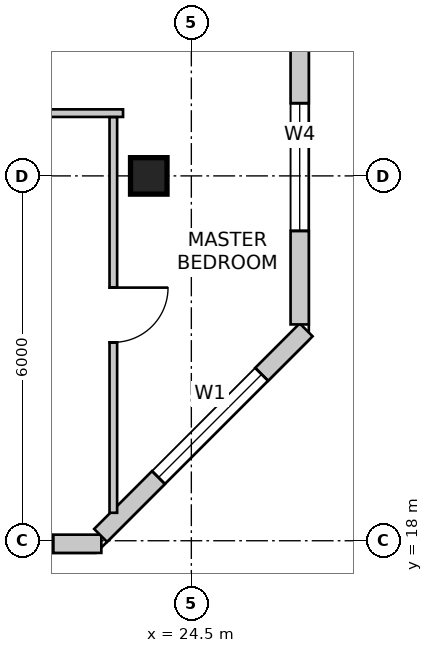
"""IFC4 building model, lengths in metres.
Left out: names, types, materials, properties, quantities, classifications, styles, units other than length and angle.
Written with IfcOpenShell. Run it as: python <this file> out.ifc"""

import sys

from ifc_helpers import new_model, si_unit, direction, frame, frame_2d, origin, origin_2d, place, context, subcontext, project, spatial, rectangle, extrude, source, transform, mapped, element, fill, save


model = new_model("IFC4")
c1 = context("Model", 3, precision=1e-05, world=origin(), true_north=direction((0.0, 1.0)))
c2 = subcontext(c1, "Body", "Model", "MODEL_VIEW")
j1 = project(units=[si_unit("LENGTHUNIT", "METRE"), si_unit("PLANEANGLEUNIT", "RADIAN")], contexts=[c1])
p1 = place(None, origin())
s1 = spatial("IfcSite", under=j1, at=p1, CompositionType="ELEMENT")
p2 = place(p1, origin())
s2 = spatial("IfcBuilding", under=s1, at=p2, CompositionType="ELEMENT")
p3 = place(p2, frame((0.0, 0.0, 249.3)))
s3 = spatial("IfcBuildingStorey", under=s2, at=p3, CompositionType="ELEMENT", Elevation=249.3)
m1 = source(origin(), c2, "Body", "SweptSolid", [
    extrude(rectangle(XDim=0.6, YDim=0.6, at=origin_2d()), origin(), (0.0, 0.0, 1.0), 3.6),
])
p4 = place(p3, frame((23.8, 24.0, 0.0), z_axis=(0.0, 0.0, 1.0), x_axis=(1.0, 0.0, 0.0)))
e1 = element("IfcColumn", 1, at=p4, inside=s3, PredefinedType="COLUMN", context=c2, shape_type="MappedRepresentation", body=[
    mapped(m1, transform((0.0, 0.0, 0.0), scale=1.0)),
])
p5 = place(p3, frame((12.678, 17.95, 0.0), z_axis=(0.0, 0.0, 1.0), x_axis=(1.0, 0.0, 0.0)))
e2 = element("IfcWall", 2, at=p5, inside=s3, PredefinedType="SOLIDWALL", context=c2, shape_type="SweptSolid", body=[
    extrude(rectangle(XDim=10.342, YDim=0.3, at=frame_2d((5.171, 0.0))), origin(), (0.0, 0.0, 1.0), 3.35),
])
m2 = source(origin(), c2, "Body", "SweptSolid", [
    extrude(rectangle(XDim=1.6, YDim=2.15, at=frame_2d((0.8, 1.075))), frame((0.0, 0.16, 0.0), z_axis=(0.0, -1.0, 0.0), x_axis=(1.0, 0.0, 0.0)), (0.0, 0.0, 1.0), 0.32),
])
p6 = place(p5, frame((4.204, 0.0, 0.0)))
e3 = element("IfcOpeningElement", 3, at=p6, cuts=e2, PredefinedType="OPENING", context=c2, shape_type="MappedRepresentation", body=[
    mapped(m2, transform((0.0, 0.0, 0.0), scale=1.0)),
])
m3 = source(origin(), c2, "Body", "SweptSolid", [
    extrude(rectangle(XDim=1.8, YDim=2.1, at=frame_2d((0.9, 1.05))), frame((0.0, 0.16, 0.0), z_axis=(0.0, -1.0, 0.0), x_axis=(1.0, 0.0, 0.0)), (0.0, 0.0, 1.0), 0.32),
])
p7 = place(p5, frame((0.697, 0.0, 0.85)))
e4 = element("IfcOpeningElement", 4, at=p7, cuts=e2, PredefinedType="OPENING", context=c2, shape_type="MappedRepresentation", body=[
    mapped(m3, transform((0.0, 0.0, 0.0), scale=1.0)),
])
m4 = source(origin(), c2, "Body", "SweptSolid", [
    extrude(rectangle(XDim=2.1, YDim=2.0, at=frame_2d((1.05, 1.0))), frame((0.0, 0.16, 0.0), z_axis=(0.0, -1.0, 0.0), x_axis=(1.0, 0.0, 0.0)), (0.0, 0.0, 1.0), 0.32),
])
p8 = place(p5, frame((7.449, 0.0, 0.85)))
e5 = element("IfcOpeningElement", 5, at=p8, cuts=e2, PredefinedType="OPENING", context=c2, shape_type="MappedRepresentation", body=[
    mapped(m4, transform((0.0, 0.0, 0.0), scale=1.0)),
])
p9 = place(p3, frame((23.008, 18.088, 0.0), z_axis=(0.0, 0.0, 1.0), x_axis=(0.707106781187, 0.707106781187, 0.0)))
e6 = element("IfcWall", 6, at=p9, inside=s3, PredefinedType="SOLIDWALL", context=c2, shape_type="SweptSolid", body=[
    extrude(rectangle(XDim=4.781, YDim=0.3, at=frame_2d((2.39, 0.0))), origin(), (0.0, 0.0, 1.0), 3.35),
])
m5 = source(origin(), c2, "Body", "SweptSolid", [
    extrude(rectangle(XDim=2.4, YDim=2.2, at=frame_2d((1.2, 1.1))), frame((0.0, 0.16, 0.0), z_axis=(0.0, -1.0, 0.0), x_axis=(1.0, 0.0, 0.0)), (0.0, 0.0, 1.0), 0.32),
])
p10 = place(p9, frame((1.346, 0.0, 0.85)))
e7 = element("IfcOpeningElement", 7, at=p10, cuts=e6, PredefinedType="OPENING", context=c2, shape_type="MappedRepresentation", body=[
    mapped(m5, transform((0.0, 0.0, 0.0), scale=1.0)),
])
p11 = place(p3, frame((26.282, 21.557, 0.0), z_axis=(0.0, 0.0, 1.0), x_axis=(0.0, 1.0, 0.0)))
e8 = element("IfcWall", 8, at=p11, inside=s3, PredefinedType="SOLIDWALL", context=c2, shape_type="SweptSolid", body=[
    extrude(rectangle(XDim=9.711, YDim=0.3, at=frame_2d((4.855, 0.0))), origin(), (0.0, 0.0, 1.0), 3.35),
])
p12 = place(p11, frame((1.538, 0.0, 0.85)))
e9 = element("IfcOpeningElement", 9, at=p12, cuts=e8, PredefinedType="OPENING", context=c2, shape_type="MappedRepresentation", body=[
    mapped(m4, transform((0.0, 0.0, 0.0), scale=1.0)),
])
p13 = place(p11, frame((5.923, 0.0, 0.85)))
e10 = element("IfcOpeningElement", 10, at=p13, cuts=e8, PredefinedType="OPENING", context=c2, shape_type="MappedRepresentation", body=[
    mapped(m5, transform((0.0, 0.0, 0.0), scale=1.0)),
])
p14 = place(p3, frame((23.377, 25.032, 0.0), z_axis=(0.0, 0.0, 1.0), x_axis=(-1.0, 0.0, 0.0)))
e11 = element("IfcWall", 11, at=p14, inside=s3, PredefinedType="PARTITIONING", context=c2, shape_type="SweptSolid", body=[
    extrude(rectangle(XDim=3.252, YDim=0.125, at=frame_2d((1.626, 0.0))), origin(), (0.0, 0.0, 1.0), 2.935),
])
p15 = place(p3, frame((23.217, 24.966, 0.0), z_axis=(0.0, 0.0, 1.0), x_axis=(0.0, -1.0, 0.0)))
e12 = element("IfcWall", 12, at=p15, inside=s3, PredefinedType="PARTITIONING", context=c2, shape_type="SweptSolid", body=[
    extrude(rectangle(XDim=6.506, YDim=0.125, at=frame_2d((3.253, 0.0))), origin(), (0.0, 0.0, 1.0), 2.935),
])
m6 = source(origin(), c2, "Body", "SweptSolid", [
    extrude(rectangle(XDim=0.9, YDim=2.15, at=frame_2d((0.45, 1.075))), frame((0.0, 0.073, 0.0), z_axis=(0.0, -1.0, 0.0), x_axis=(1.0, 0.0, 0.0)), (0.0, 0.0, 1.0), 0.145),
])
p16 = place(p15, frame((2.803, 0.0, 0.0)))
e13 = element("IfcOpeningElement", 13, at=p16, cuts=e12, PredefinedType="OPENING", context=c2, shape_type="MappedRepresentation", body=[
    mapped(m6, transform((0.0, 0.0, 0.0), scale=1.0)),
])
m7 = source(origin(), c2, "Body", "SweptSolid", [
    extrude(rectangle(XDim=2.1, YDim=2.0, at=frame_2d((1.05, 1.0))), frame((0.0, -0.015, 0.0), z_axis=(0.0, -1.0, 0.0), x_axis=(1.0, 0.0, 0.0)), (0.0, 0.0, 1.0), 0.06),
])
p17 = place(p8, origin())
e14 = element("IfcWindow", 14, at=p17, inside=s3, PartitioningType="SINGLE_PANEL", PredefinedType="WINDOW", context=c2, shape_type="MappedRepresentation", body=[
    mapped(m7, transform((0.0, 0.0, 0.0), scale=1.0)),
])
fill(e5, e14)
m8 = source(origin(), c2, "Body", "SweptSolid", [
    extrude(rectangle(XDim=2.4, YDim=2.2, at=frame_2d((1.2, 1.1))), frame((0.0, -0.015, 0.0), z_axis=(0.0, -1.0, 0.0), x_axis=(1.0, 0.0, 0.0)), (0.0, 0.0, 1.0), 0.06),
])
p18 = place(p10, origin())
e15 = element("IfcWindow", 15, at=p18, inside=s3, PartitioningType="SINGLE_PANEL", PredefinedType="WINDOW", context=c2, shape_type="MappedRepresentation", body=[
    mapped(m8, transform((0.0, 0.0, 0.0), scale=1.0)),
])
fill(e7, e15)
p19 = place(p12, origin())
e16 = element("IfcWindow", 16, at=p19, inside=s3, PartitioningType="SINGLE_PANEL", PredefinedType="WINDOW", context=c2, shape_type="MappedRepresentation", body=[
    mapped(m7, transform((0.0, 0.0, 0.0), scale=1.0)),
])
fill(e9, e16)
m9 = source(origin(), c2, "Body", "SweptSolid", [
    extrude(rectangle(XDim=0.9, YDim=2.15, at=frame_2d((0.45, 1.075))), frame((0.0, 0.025, 0.0), z_axis=(0.0, -1.0, 0.0), x_axis=(1.0, 0.0, 0.0)), (0.0, 0.0, 1.0), 0.05),
])
p20 = place(p16, origin())
e17 = element("IfcDoor", 17, at=p20, inside=s3, OperationType="SINGLE_SWING_LEFT", PredefinedType="DOOR", context=c2, shape_type="MappedRepresentation", body=[
    mapped(m9, transform((0.0, 0.0, 0.0), scale=1.0)),
])
fill(e13, e17)
save(model, sys.argv[1])
